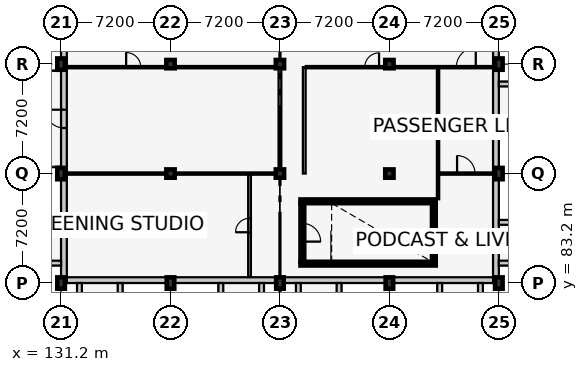
"""IFC4 building model, lengths in metres.
Left out: names, types, materials, properties, quantities, classifications, styles, units other than length and angle.
Written with IfcOpenShell. Run it as: python <this file> out.ifc"""

import sys

from ifc_helpers import new_model, si_unit, direction, frame, frame_2d, origin, origin_2d, place, context, subcontext, project, spatial, rectangle, extrude, element, fill, save


model = new_model("IFC4")
c1 = context("Model", 3, precision=1e-05, world=origin(), true_north=direction((0.0, 1.0)))
c2 = subcontext(c1, "Body", "Model", "MODEL_VIEW")
j1 = project(units=[si_unit("LENGTHUNIT", "METRE"), si_unit("PLANEANGLEUNIT", "RADIAN")], contexts=[c1])
p1 = place(None, origin())
s1 = spatial("IfcSite", under=j1, at=p1, CompositionType="ELEMENT")
p2 = place(p1, origin())
s2 = spatial("IfcBuilding", under=s1, at=p2, CompositionType="ELEMENT")
p3 = place(p2, frame((0.0, 0.0, 29.7)))
s3 = spatial("IfcBuildingStorey", under=s2, at=p3, CompositionType="ELEMENT", Elevation=29.7)
for number, where, z_axis, x_axis in (
    (1, (131.2, 83.2, 0.0), (0.0, 0.0, 1.0), (1.0, 0.0, 0.0)),
    (2, (131.2, 90.4, 0.0), (0.0, 0.0, 1.0), (1.0, 0.0, 0.0)),
    (3, (131.2, 97.6, 0.0), (0.0, 0.0, 1.0), (1.0, 0.0, 0.0)),
    (4, (138.4, 83.2, 0.0), (0.0, 0.0, 1.0), (1.0, 0.0, 0.0)),
):
    element("IfcColumn", number, at=place(p3, frame(where, z_axis=z_axis, x_axis=x_axis)), inside=s3, PredefinedType="COLUMN", context=c2, shape_type="SweptSolid", body=[
        extrude(rectangle(XDim=0.5, YDim=0.75, at=origin_2d()), origin(), (0.0, 0.0, 1.0), 4.2),
    ])
for number, where, z_axis, x_axis in (
    (5, (138.4, 90.4, 0.0), (0.0, 0.0, 1.0), (1.0, 0.0, 0.0)),
    (6, (138.4, 97.6, 0.0), (0.0, 0.0, 1.0), (1.0, 0.0, 0.0)),
):
    element("IfcColumn", number, at=place(p3, frame(where, z_axis=z_axis, x_axis=x_axis)), inside=s3, PredefinedType="COLUMN", context=c2, shape_type="SweptSolid", body=[
        extrude(rectangle(XDim=0.55, YDim=0.55, at=origin_2d()), origin(), (0.0, 0.0, 1.0), 4.2),
    ])
p4 = place(p3, frame((145.6, 83.2, 0.0), z_axis=(0.0, 0.0, 1.0), x_axis=(1.0, 0.0, 0.0)))
e7 = element("IfcColumn", 7, at=p4, inside=s3, PredefinedType="COLUMN", context=c2, shape_type="SweptSolid", body=[
    extrude(rectangle(XDim=0.5, YDim=0.75, at=origin_2d()), origin(), (0.0, 0.0, 1.0), 4.2),
])
for number, where, z_axis, x_axis in (
    (8, (145.6, 90.4, 0.0), (0.0, 0.0, 1.0), (1.0, 0.0, 0.0)),
    (9, (145.6, 97.6, 0.0), (0.0, 0.0, 1.0), (1.0, 0.0, 0.0)),
):
    element("IfcColumn", number, at=place(p3, frame(where, z_axis=z_axis, x_axis=x_axis)), inside=s3, PredefinedType="COLUMN", context=c2, shape_type="SweptSolid", body=[
        extrude(rectangle(XDim=0.55, YDim=0.55, at=origin_2d()), origin(), (0.0, 0.0, 1.0), 4.2),
    ])
p5 = place(p3, frame((152.8, 83.2, 0.0), z_axis=(0.0, 0.0, 1.0), x_axis=(1.0, 0.0, 0.0)))
e10 = element("IfcColumn", 10, at=p5, inside=s3, PredefinedType="COLUMN", context=c2, shape_type="SweptSolid", body=[
    extrude(rectangle(XDim=0.5, YDim=0.75, at=origin_2d()), origin(), (0.0, 0.0, 1.0), 4.2),
])
for number, where, z_axis, x_axis in (
    (11, (152.8, 90.4, 0.0), (0.0, 0.0, 1.0), (1.0, 0.0, 0.0)),
    (12, (152.8, 97.6, 0.0), (0.0, 0.0, 1.0), (1.0, 0.0, 0.0)),
):
    element("IfcColumn", number, at=place(p3, frame(where, z_axis=z_axis, x_axis=x_axis)), inside=s3, PredefinedType="COLUMN", context=c2, shape_type="SweptSolid", body=[
        extrude(rectangle(XDim=0.55, YDim=0.55, at=origin_2d()), origin(), (0.0, 0.0, 1.0), 4.2),
    ])
for number, where, z_axis, x_axis in (
    (13, (160.0, 83.2, 0.0), (0.0, 0.0, 1.0), (1.0, 0.0, 0.0)),
    (14, (160.0, 90.4, 0.0), (0.0, 0.0, 1.0), (1.0, 0.0, 0.0)),
    (15, (160.0, 97.6, 0.0), (0.0, 0.0, 1.0), (1.0, 0.0, 0.0)),
):
    element("IfcColumn", number, at=place(p3, frame(where, z_axis=z_axis, x_axis=x_axis)), inside=s3, PredefinedType="COLUMN", context=c2, shape_type="SweptSolid", body=[
        extrude(rectangle(XDim=0.5, YDim=0.75, at=origin_2d()), origin(), (0.0, 0.0, 1.0), 4.2),
    ])
p6 = place(p3, frame((160.0, 83.39, 0.0), z_axis=(0.0, 0.0, 1.0), x_axis=(-1.0, 0.0, 0.0)))
e16 = element("IfcWall", 16, at=p6, inside=s3, PredefinedType="SOLIDWALL", context=c2, shape_type="SweptSolid", body=[
    extrude(rectangle(XDim=28.8, YDim=0.38, at=frame_2d((14.4, 0.0))), origin(), (0.0, 0.0, 1.0), 3.495),
])
p7 = place(p3, frame((132.41, 83.2, 0.0), z_axis=(0.0, 0.0, 1.0), x_axis=(0.0, -1.0, 0.0)))
e17 = element("IfcWall", 17, at=p7, inside=s3, PredefinedType="SOLIDWALL", context=c2, shape_type="SweptSolid", body=[
    extrude(rectangle(XDim=1.793, YDim=0.32, at=frame_2d((0.896, 0.0))), origin(), (0.0, 0.0, 1.0), 4.18),
])
for number, where, z_axis, x_axis in (
    (18, (135.09, 83.2, 0.0), (0.0, 0.0, 1.0), (0.0, -1.0, 0.0)),
    (19, (141.71, 83.2, 0.0), (0.0, 0.0, 1.0), (0.0, -1.0, 0.0)),
):
    element("IfcWall", number, at=place(p3, frame(where, z_axis=z_axis, x_axis=x_axis)), inside=s3, PredefinedType="SOLIDWALL", context=c2, shape_type="SweptSolid", body=[
        extrude(rectangle(XDim=1.35, YDim=0.32, at=frame_2d((0.675, 0.0))), origin(), (0.0, 0.0, 1.0), 4.18),
    ])
for number, where, z_axis, x_axis in (
    (20, (144.39, 83.2, 0.0), (0.0, 0.0, 1.0), (0.0, -1.0, 0.0)),
    (21, (146.81, 83.2, 0.0), (0.0, 0.0, 1.0), (0.0, -1.0, 0.0)),
):
    element("IfcWall", number, at=place(p3, frame(where, z_axis=z_axis, x_axis=x_axis)), inside=s3, PredefinedType="SOLIDWALL", context=c2, shape_type="SweptSolid", body=[
        extrude(rectangle(XDim=1.793, YDim=0.32, at=frame_2d((0.896, 0.0))), origin(), (0.0, 0.0, 1.0), 4.18),
    ])
for number, where, z_axis, x_axis in (
    (22, (149.49, 83.2, 0.0), (0.0, 0.0, 1.0), (0.0, -1.0, 0.0)),
    (23, (156.11, 83.2, 0.0), (0.0, 0.0, 1.0), (0.0, -1.0, 0.0)),
):
    element("IfcWall", number, at=place(p3, frame(where, z_axis=z_axis, x_axis=x_axis)), inside=s3, PredefinedType="SOLIDWALL", context=c2, shape_type="SweptSolid", body=[
        extrude(rectangle(XDim=1.35, YDim=0.32, at=frame_2d((0.675, 0.0))), origin(), (0.0, 0.0, 1.0), 4.18),
    ])
p8 = place(p3, frame((158.79, 83.2, 0.0), z_axis=(0.0, 0.0, 1.0), x_axis=(0.0, -1.0, 0.0)))
e24 = element("IfcWall", 24, at=p8, inside=s3, PredefinedType="SOLIDWALL", context=c2, shape_type="SweptSolid", body=[
    extrude(rectangle(XDim=1.793, YDim=0.32, at=frame_2d((0.896, 0.0))), origin(), (0.0, 0.0, 1.0), 4.18),
])
p9 = place(p3, frame((159.81, 112.0, 0.0), z_axis=(0.0, 0.0, 1.0), x_axis=(0.0, -1.0, 0.0)))
e25 = element("IfcWall", 25, at=p9, inside=s3, PredefinedType="SOLIDWALL", context=c2, shape_type="SweptSolid", body=[
    extrude(rectangle(XDim=28.8, YDim=0.38, at=frame_2d((14.4, 0.0))), origin(), (0.0, 0.0, 1.0), 3.455),
])
p10 = place(p3, frame((160.0, 84.51, 0.0), z_axis=(0.0, 0.0, 1.0), x_axis=(1.0, 0.0, 0.0)))
e26 = element("IfcWall", 26, at=p10, inside=s3, PredefinedType="SOLIDWALL", context=c2, shape_type="SweptSolid", body=[
    extrude(rectangle(XDim=1.35, YDim=0.32, at=frame_2d((0.675, 0.0))), origin(), (0.0, 0.0, 1.0), 4.18),
])
for number, where, z_axis, x_axis in (
    (27, (160.0, 87.19, 0.0), (0.0, 0.0, 1.0), (1.0, 0.0, 0.0)),
    (28, (160.0, 93.61, 0.0), (0.0, 0.0, 1.0), (1.0, 0.0, 0.0)),
):
    element("IfcWall", number, at=place(p3, frame(where, z_axis=z_axis, x_axis=x_axis)), inside=s3, PredefinedType="SOLIDWALL", context=c2, shape_type="SweptSolid", body=[
        extrude(rectangle(XDim=1.793, YDim=0.32, at=frame_2d((0.896, 0.0))), origin(), (0.0, 0.0, 1.0), 4.18),
    ])
p11 = place(p3, frame((160.0, 96.29, 0.0), z_axis=(0.0, 0.0, 1.0), x_axis=(1.0, 0.0, 0.0)))
e29 = element("IfcWall", 29, at=p11, inside=s3, PredefinedType="SOLIDWALL", context=c2, shape_type="SweptSolid", body=[
    extrude(rectangle(XDim=1.35, YDim=0.32, at=frame_2d((0.675, 0.0))), origin(), (0.0, 0.0, 1.0), 4.18),
])
p12 = place(p3, frame((131.39, 83.2, 0.0), z_axis=(0.0, 0.0, 1.0), x_axis=(0.0, 1.0, 0.0)))
e30 = element("IfcWall", 30, at=p12, inside=s3, PredefinedType="SOLIDWALL", context=c2, shape_type="SweptSolid", body=[
    extrude(rectangle(XDim=28.8, YDim=0.38, at=frame_2d((14.4, 0.0))), origin(), (0.0, 0.0, 1.0), 3.455),
])
p13 = place(p12, frame((10.2, 0.0, 0.0)))
e31 = element("IfcOpeningElement", 31, at=p13, cuts=e30, PredefinedType="OPENING", context=c2, shape_type="SweptSolid", body=[
    extrude(rectangle(XDim=1.2, YDim=2.15, at=frame_2d((0.6, 1.075))), frame((0.0, 0.202, 0.0), z_axis=(0.0, -1.0, 0.0), x_axis=(1.0, 0.0, 0.0)), (0.0, 0.0, 1.0), 0.404),
])
p14 = place(p3, frame((131.2, 84.51, 0.0), z_axis=(0.0, 0.0, 1.0), x_axis=(-1.0, 0.0, 0.0)))
e32 = element("IfcWall", 32, at=p14, inside=s3, PredefinedType="SOLIDWALL", context=c2, shape_type="SweptSolid", body=[
    extrude(rectangle(XDim=1.793, YDim=0.32, at=frame_2d((0.896, 0.0))), origin(), (0.0, 0.0, 1.0), 4.18),
])
p15 = place(p3, frame((131.2, 87.19, 0.0), z_axis=(0.0, 0.0, 1.0), x_axis=(-1.0, 0.0, 0.0)))
e33 = element("IfcWall", 33, at=p15, inside=s3, PredefinedType="SOLIDWALL", context=c2, shape_type="SweptSolid", body=[
    extrude(rectangle(XDim=1.35, YDim=0.32, at=frame_2d((0.675, 0.0))), origin(), (0.0, 0.0, 1.0), 4.18),
])
for number, where, z_axis, x_axis in (
    (34, (146.95, 84.475, 0.0), (0.0, 0.0, 1.0), (1.0, 0.0, 0.0)),
    (35, (155.85, 88.575, 0.0), (0.0, 0.0, 1.0), (-1.0, 0.0, 0.0)),
):
    element("IfcWall", number, at=place(p3, frame(where, z_axis=z_axis, x_axis=x_axis)), inside=s3, PredefinedType="SHEAR", context=c2, shape_type="SweptSolid", body=[
        extrude(rectangle(XDim=8.9, YDim=0.25, at=frame_2d((4.45, 0.0))), origin(), (0.0, 0.0, 1.0), 4.2),
    ])
p16 = place(p3, frame((147.075, 88.45, 0.0), z_axis=(0.0, 0.0, 1.0), x_axis=(0.0, -1.0, 0.0)))
e36 = element("IfcWall", 36, at=p16, inside=s3, PredefinedType="SHEAR", context=c2, shape_type="SweptSolid", body=[
    extrude(rectangle(XDim=3.85, YDim=0.25, at=frame_2d((1.925, 0.0))), origin(), (0.0, 0.0, 1.0), 4.2),
])
p17 = place(p16, frame((1.325, 0.0, 0.0)))
e37 = element("IfcOpeningElement", 37, at=p17, cuts=e36, PredefinedType="OPENING", context=c2, shape_type="SweptSolid", body=[
    extrude(rectangle(XDim=1.2, YDim=2.15, at=frame_2d((0.6, 1.075))), frame((0.0, 0.137, 0.0), z_axis=(0.0, -1.0, 0.0), x_axis=(1.0, 0.0, 0.0)), (0.0, 0.0, 1.0), 0.274),
])
p18 = place(p3, frame((155.725, 84.6, 0.0), z_axis=(0.0, 0.0, 1.0), x_axis=(0.0, 1.0, 0.0)))
e38 = element("IfcWall", 38, at=p18, inside=s3, PredefinedType="SHEAR", context=c2, shape_type="SweptSolid", body=[
    extrude(rectangle(XDim=3.85, YDim=0.25, at=frame_2d((1.925, 0.0))), origin(), (0.0, 0.0, 1.0), 4.2),
])
p19 = place(p3, frame((143.6, 83.6, 0.0), z_axis=(0.0, 0.0, 1.0), x_axis=(0.0, 1.0, 0.0)))
e39 = element("IfcWall", 39, at=p19, inside=s3, PredefinedType="PARTITIONING", context=c2, shape_type="SweptSolid", body=[
    extrude(rectangle(XDim=6.8, YDim=0.18, at=frame_2d((3.4, 0.0))), origin(), (0.0, 0.0, 1.0), 4.2),
])
p20 = place(p19, frame((2.94, 0.0, 0.0)))
e40 = element("IfcOpeningElement", 40, at=p20, cuts=e39, PredefinedType="OPENING", context=c2, shape_type="SweptSolid", body=[
    extrude(rectangle(XDim=0.92, YDim=2.08, at=frame_2d((0.46, 1.04))), frame((0.0, 0.102, 0.0), z_axis=(0.0, -1.0, 0.0), x_axis=(1.0, 0.0, 0.0)), (0.0, 0.0, 1.0), 0.204),
])
p21 = place(p3, frame((145.6, 90.4, 0.0), z_axis=(0.0, 0.0, 1.0), x_axis=(0.0, 1.0, 0.0)))
e41 = element("IfcWall", 41, at=p21, inside=s3, PredefinedType="PARTITIONING", context=c2, shape_type="SweptSolid", body=[
    extrude(rectangle(XDim=7.0, YDim=0.18, at=frame_2d((3.5, 0.0))), origin(), (0.0, 0.0, 1.0), 3.575),
])
p22 = place(p3, frame((147.2, 90.4, 0.0), z_axis=(0.0, 0.0, 1.0), x_axis=(0.0, 1.0, 0.0)))
e42 = element("IfcWall", 42, at=p22, inside=s3, PredefinedType="PARTITIONING", context=c2, shape_type="SweptSolid", body=[
    extrude(rectangle(XDim=7.0, YDim=0.18, at=frame_2d((3.5, 0.0))), origin(), (0.0, 0.0, 1.0), 4.2),
])
p23 = place(p3, frame((131.6, 90.4, 0.0), z_axis=(0.0, 0.0, 1.0), x_axis=(1.0, 0.0, 0.0)))
e43 = element("IfcWall", 43, at=p23, inside=s3, PredefinedType="PARTITIONING", context=c2, shape_type="SweptSolid", body=[
    extrude(rectangle(XDim=13.9, YDim=0.15, at=frame_2d((6.95, 0.0))), origin(), (0.0, 0.0, 1.0), 3.525),
])
p24 = place(p3, frame((131.6, 97.4, 0.0), z_axis=(0.0, 0.0, 1.0), x_axis=(1.0, 0.0, 0.0)))
e44 = element("IfcWall", 44, at=p24, inside=s3, PredefinedType="PARTITIONING", context=c2, shape_type="SweptSolid", body=[
    extrude(rectangle(XDim=13.9, YDim=0.15, at=frame_2d((6.95, 0.0))), origin(), (0.0, 0.0, 1.0), 3.525),
])
p25 = place(p24, frame((3.882, 0.0, 0.0)))
e45 = element("IfcOpeningElement", 45, at=p25, cuts=e44, PredefinedType="OPENING", context=c2, shape_type="SweptSolid", body=[
    extrude(rectangle(XDim=0.96, YDim=2.1, at=frame_2d((0.48, 1.05))), frame((0.0, 0.087, 0.0), z_axis=(0.0, -1.0, 0.0), x_axis=(1.0, 0.0, 0.0)), (0.0, 0.0, 1.0), 0.174),
])
p26 = place(p3, frame((147.3, 97.4, 0.0), z_axis=(0.0, 0.0, 1.0), x_axis=(1.0, 0.0, 0.0)))
e46 = element("IfcWall", 46, at=p26, inside=s3, PredefinedType="PARTITIONING", context=c2, shape_type="SweptSolid", body=[
    extrude(rectangle(XDim=8.7, YDim=0.15, at=frame_2d((4.35, 0.0))), origin(), (0.0, 0.0, 1.0), 3.375),
])
p27 = place(p26, frame((3.88, 0.0, 0.0)))
e47 = element("IfcOpeningElement", 47, at=p27, cuts=e46, PredefinedType="OPENING", context=c2, shape_type="SweptSolid", body=[
    extrude(rectangle(XDim=0.94, YDim=2.1, at=frame_2d((0.47, 1.05))), frame((0.0, 0.087, 0.0), z_axis=(0.0, -1.0, 0.0), x_axis=(1.0, 0.0, 0.0)), (0.0, 0.0, 1.0), 0.174),
])
p28 = place(p3, frame((156.0, 88.71, 0.0), z_axis=(0.0, 0.0, 1.0), x_axis=(0.0, 1.0, 0.0)))
e48 = element("IfcWall", 48, at=p28, inside=s3, PredefinedType="PARTITIONING", context=c2, shape_type="SweptSolid", body=[
    extrude(rectangle(XDim=8.605, YDim=0.15, at=frame_2d((4.302, 0.0))), origin(), (0.0, 0.0, 1.0), 4.2),
])
p29 = place(p3, frame((156.085, 90.4, 0.0), z_axis=(0.0, 0.0, 1.0), x_axis=(1.0, 0.0, 0.0)))
e49 = element("IfcWall", 49, at=p29, inside=s3, PredefinedType="PARTITIONING", context=c2, shape_type="SweptSolid", body=[
    extrude(rectangle(XDim=3.515, YDim=0.15, at=frame_2d((1.758, 0.0))), origin(), (0.0, 0.0, 1.0), 3.375),
])
p30 = place(p29, frame((1.167, 0.0, 0.0)))
e50 = element("IfcOpeningElement", 50, at=p30, cuts=e49, PredefinedType="OPENING", context=c2, shape_type="SweptSolid", body=[
    extrude(rectangle(XDim=1.18, YDim=2.2, at=frame_2d((0.59, 1.1))), frame((0.0, 0.087, 0.0), z_axis=(0.0, -1.0, 0.0), x_axis=(1.0, 0.0, 0.0)), (0.0, 0.0, 1.0), 0.174),
])
p31 = place(p3, frame((156.085, 97.4, 0.0), z_axis=(0.0, 0.0, 1.0), x_axis=(1.0, 0.0, 0.0)))
e51 = element("IfcWall", 51, at=p31, inside=s3, PredefinedType="PARTITIONING", context=c2, shape_type="SweptSolid", body=[
    extrude(rectangle(XDim=3.515, YDim=0.15, at=frame_2d((1.758, 0.0))), origin(), (0.0, 0.0, 1.0), 3.375),
])
p32 = place(p31, frame((1.117, 0.0, 0.0)))
e52 = element("IfcOpeningElement", 52, at=p32, cuts=e51, PredefinedType="OPENING", context=c2, shape_type="SweptSolid", body=[
    extrude(rectangle(XDim=1.28, YDim=2.2, at=frame_2d((0.64, 1.1))), frame((0.0, 0.087, 0.0), z_axis=(0.0, -1.0, 0.0), x_axis=(1.0, 0.0, 0.0)), (0.0, 0.0, 1.0), 0.174),
])
p33 = place(p13, origin())
e53 = element("IfcDoor", 53, at=p33, inside=s3, OperationType="SINGLE_SWING_RIGHT", PredefinedType="DOOR", context=c2, shape_type="SweptSolid", body=[
    extrude(rectangle(XDim=1.2, YDim=2.15, at=frame_2d((0.6, 1.075))), frame((0.0, 0.025, 0.0), z_axis=(0.0, -1.0, 0.0), x_axis=(1.0, 0.0, 0.0)), (0.0, 0.0, 1.0), 0.05),
])
fill(e31, e53)
p34 = place(p17, origin())
e54 = element("IfcDoor", 54, at=p34, inside=s3, OperationType="SINGLE_SWING_RIGHT", PredefinedType="DOOR", context=c2, shape_type="SweptSolid", body=[
    extrude(rectangle(XDim=1.2, YDim=2.15, at=frame_2d((0.6, 1.075))), frame((0.0, 0.025, 0.0), z_axis=(0.0, -1.0, 0.0), x_axis=(1.0, 0.0, 0.0)), (0.0, 0.0, 1.0), 0.05),
])
fill(e37, e54)
p35 = place(p25, origin())
e55 = element("IfcDoor", 55, at=p35, inside=s3, OperationType="SINGLE_SWING_LEFT", PredefinedType="DOOR", context=c2, shape_type="SweptSolid", body=[
    extrude(rectangle(XDim=0.96, YDim=2.1, at=frame_2d((0.48, 1.05))), frame((0.0, 0.025, 0.0), z_axis=(0.0, -1.0, 0.0), x_axis=(1.0, 0.0, 0.0)), (0.0, 0.0, 1.0), 0.05),
])
fill(e45, e55)
p36 = place(p27, origin())
e56 = element("IfcDoor", 56, at=p36, inside=s3, OperationType="SINGLE_SWING_RIGHT", PredefinedType="DOOR", context=c2, shape_type="SweptSolid", body=[
    extrude(rectangle(XDim=0.94, YDim=2.1, at=frame_2d((0.47, 1.05))), frame((0.0, 0.025, 0.0), z_axis=(0.0, -1.0, 0.0), x_axis=(1.0, 0.0, 0.0)), (0.0, 0.0, 1.0), 0.05),
])
fill(e47, e56)
p37 = place(p20, origin())
e57 = element("IfcDoor", 57, at=p37, inside=s3, OperationType="SINGLE_SWING_LEFT", PredefinedType="DOOR", context=c2, shape_type="SweptSolid", body=[
    extrude(rectangle(XDim=0.92, YDim=2.08, at=frame_2d((0.46, 1.04))), frame((0.0, 0.025, 0.0), z_axis=(0.0, -1.0, 0.0), x_axis=(1.0, 0.0, 0.0)), (0.0, 0.0, 1.0), 0.05),
])
fill(e40, e57)
p38 = place(p32, origin())
e58 = element("IfcDoor", 58, at=p38, inside=s3, OperationType="SINGLE_SWING_RIGHT", PredefinedType="DOOR", context=c2, shape_type="SweptSolid", body=[
    extrude(rectangle(XDim=1.28, YDim=2.2, at=frame_2d((0.64, 1.1))), frame((0.0, 0.025, 0.0), z_axis=(0.0, -1.0, 0.0), x_axis=(1.0, 0.0, 0.0)), (0.0, 0.0, 1.0), 0.05),
])
fill(e52, e58)
p39 = place(p30, origin())
e59 = element("IfcDoor", 59, at=p39, inside=s3, OperationType="SINGLE_SWING_LEFT", PredefinedType="DOOR", context=c2, shape_type="SweptSolid", body=[
    extrude(rectangle(XDim=1.18, YDim=2.2, at=frame_2d((0.59, 1.1))), frame((0.0, 0.025, 0.0), z_axis=(0.0, -1.0, 0.0), x_axis=(1.0, 0.0, 0.0)), (0.0, 0.0, 1.0), 0.05),
])
fill(e50, e59)
save(model, sys.argv[1])
